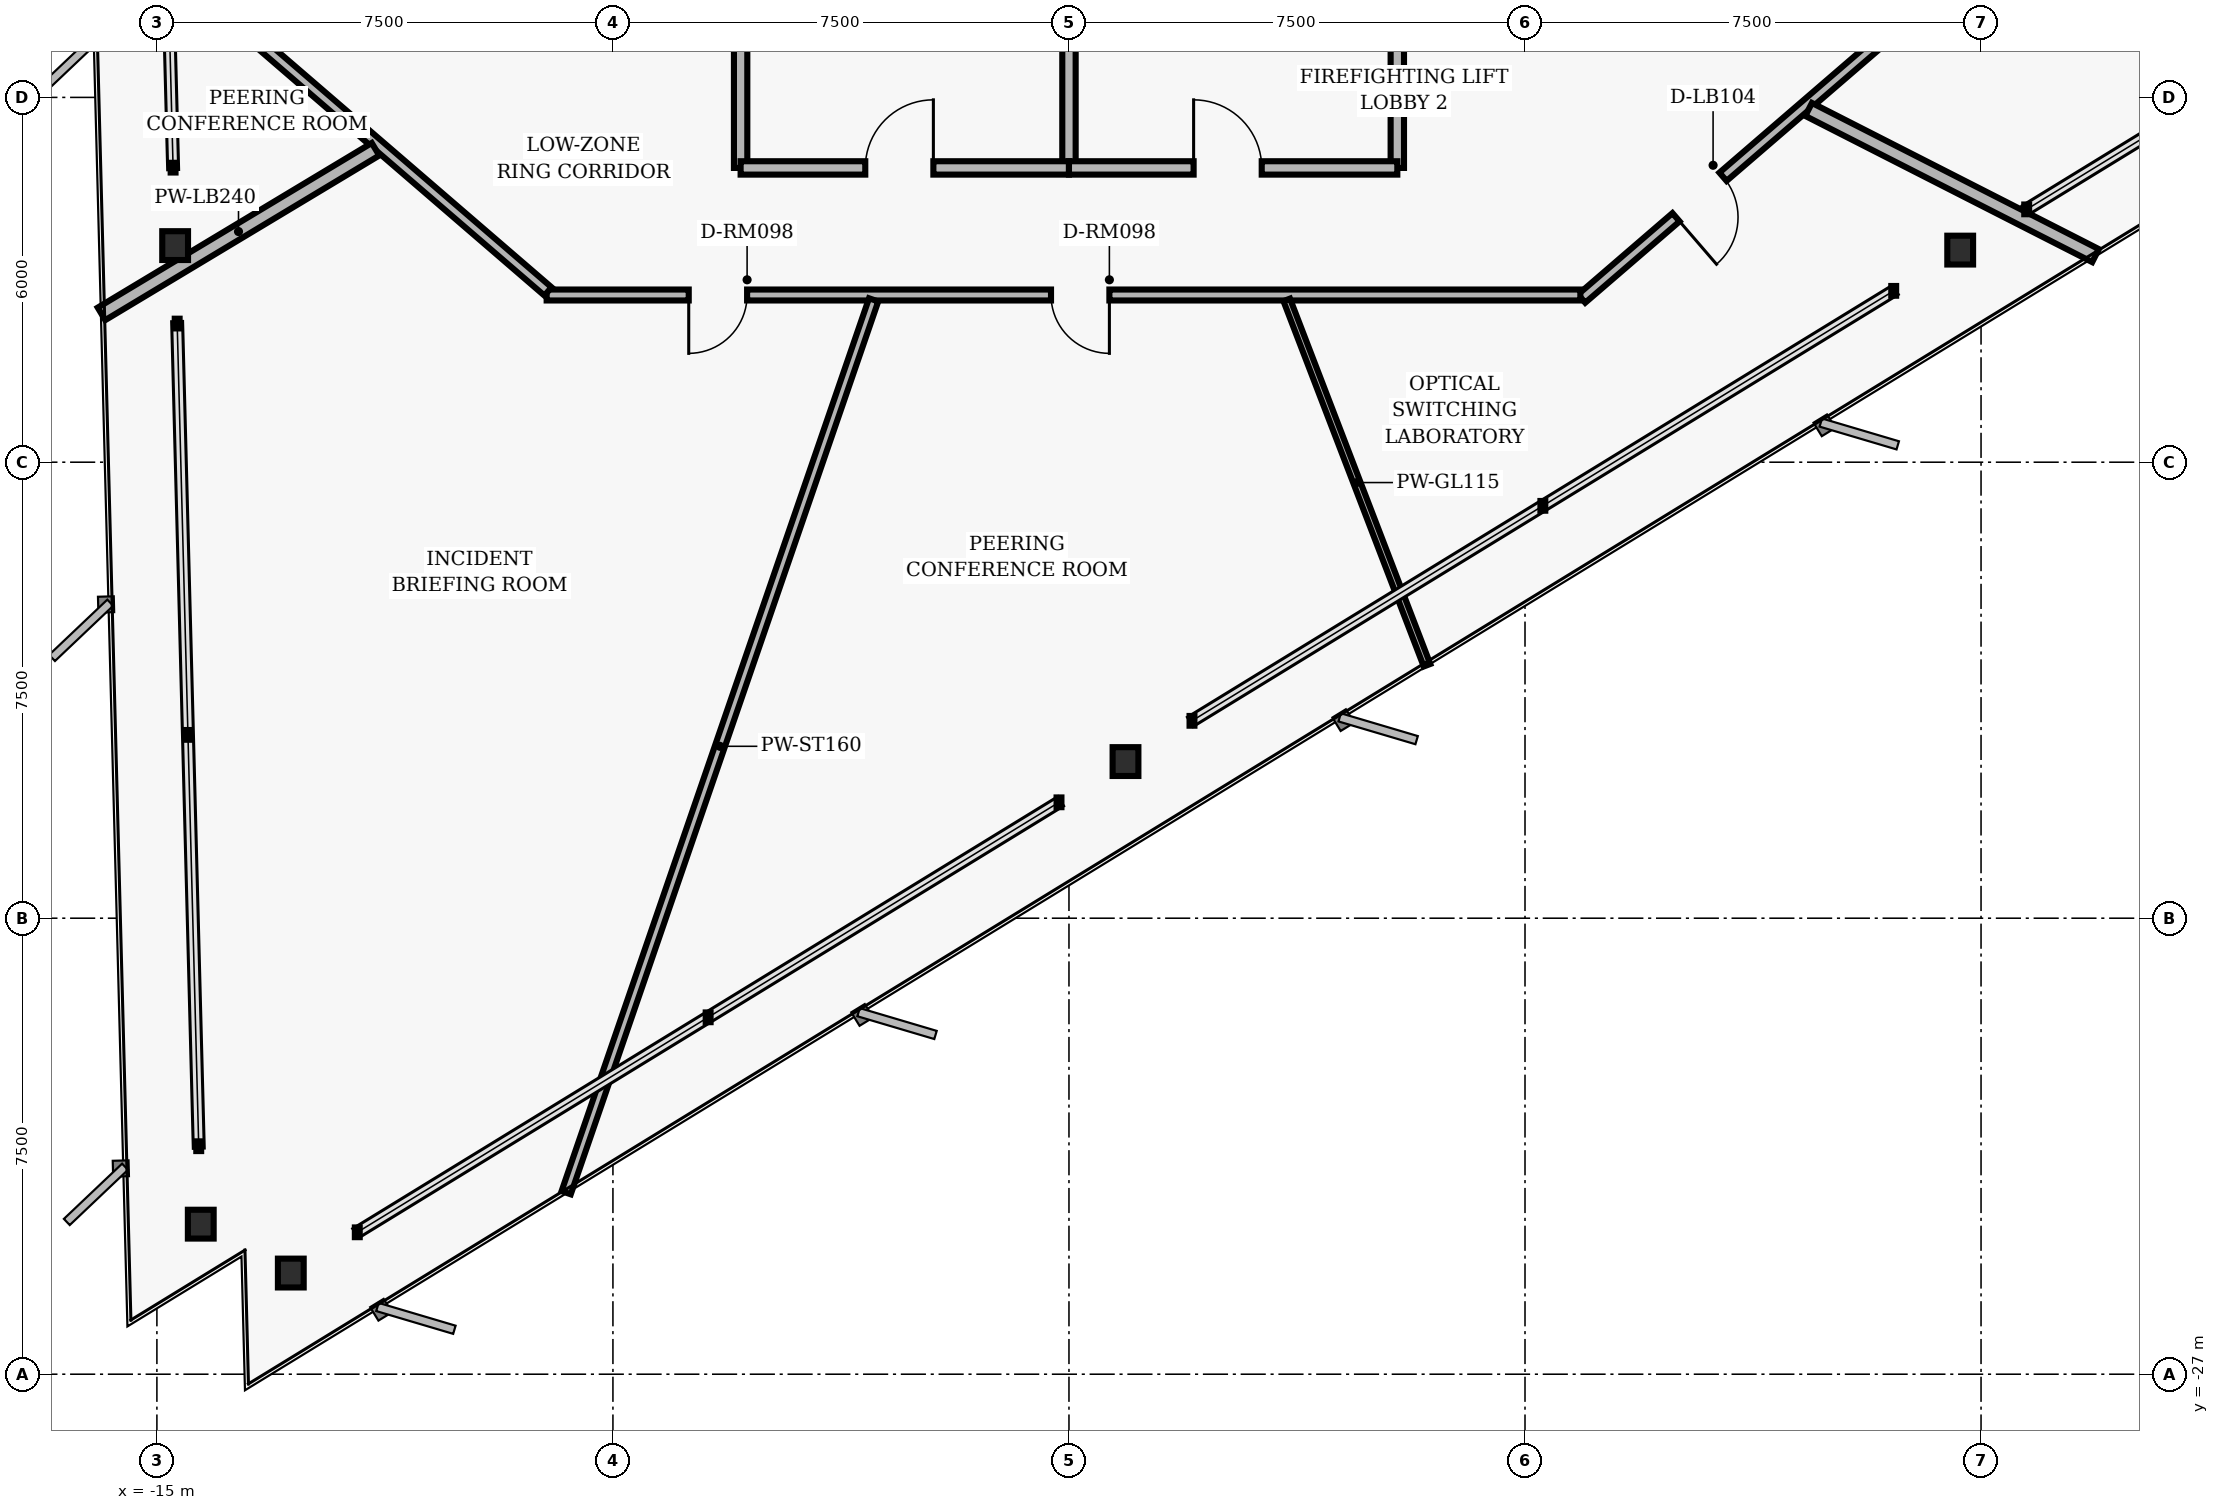
"""IFC4 building model, lengths in metres.
Left out: names, types, materials, properties, quantities, classifications, styles, units other than length and angle.
Written with IfcOpenShell. Run it as: python <this file> out.ifc"""

import sys

from ifc_helpers import new_model, si_unit, direction, frame, frame_2d, origin, origin_2d, place, context, subcontext, project, spatial, rectangle, i_section, extrude, element, fill, save


model = new_model("IFC4")
c1 = context("Model", 3, precision=1e-05, world=origin(), true_north=direction((0.0, 1.0)))
c2 = subcontext(c1, "Body", "Model", "MODEL_VIEW")
j1 = project(units=[si_unit("LENGTHUNIT", "METRE"), si_unit("PLANEANGLEUNIT", "RADIAN")], contexts=[c1])
p1 = place(None, origin())
s1 = spatial("IfcSite", under=j1, at=p1, CompositionType="ELEMENT")
p2 = place(p1, origin())
s2 = spatial("IfcBuilding", under=s1, at=p2, CompositionType="ELEMENT")
p3 = place(p2, frame((0.0, 0.0, 35.68)))
s3 = spatial("IfcBuildingStorey", under=s2, at=p3, CompositionType="ELEMENT", Elevation=35.68)
for number, where, z_axis, x_axis in (
    (1, (-14.7, -8.438, 0.0), (0.0, 0.0, 1.0), (1.0, 0.0, 0.0)),
    (2, (-14.279, -24.532, 0.0), (0.0, 0.0, 1.0), (1.0, 0.0, 0.0)),
    (3, (-12.798, -25.336, 0.0), (0.0, 0.0, 1.0), (1.0, 0.0, 0.0)),
    (4, (0.93, -16.924, 0.0), (0.0, 0.0, 1.0), (1.0, 0.0, 0.0)),
    (5, (14.657, -8.512, 0.0), (0.0, 0.0, 1.0), (1.0, 0.0, 0.0)),
):
    element("IfcColumn", number, at=place(p3, frame(where, z_axis=z_axis, x_axis=x_axis)), inside=s3, PredefinedType="COLUMN", context=c2, shape_type="SweptSolid", body=[
        extrude(i_section(OverallWidth=0.424, OverallDepth=0.474, WebThickness=0.048, FlangeThickness=0.077, FilletRadius=0.025, at=origin_2d()), origin(), (0.0, 0.0, 1.0), 3.36),
    ])
for number, where, z_axis, x_axis in (
    (6, (-5.4, -7.16, 0.0), (0.0, 0.0, 1.0), (0.0, 1.0, 0.0)),
    (7, (5.4, -7.16, 0.0), (0.0, 0.0, 1.0), (0.0, 1.0, 0.0)),
):
    element("IfcWall", number, at=place(p3, frame(where, z_axis=z_axis, x_axis=x_axis)), inside=s3, PredefinedType="PARTITIONING", context=c2, shape_type="SweptSolid", body=[
        extrude(rectangle(XDim=2.71, YDim=0.22, at=frame_2d((1.355, 0.0))), origin(), (0.0, 0.0, 1.0), 3.073),
    ])
p4 = place(p3, frame((0.0, -7.16, 0.0), z_axis=(0.0, 0.0, 1.0), x_axis=(0.0, 1.0, 0.0)))
e8 = element("IfcWall", 8, at=p4, inside=s3, PredefinedType="PARTITIONING", context=c2, shape_type="SweptSolid", body=[
    extrude(rectangle(XDim=2.81, YDim=0.22, at=frame_2d((1.405, 0.0))), origin(), (0.0, 0.0, 1.0), 3.073),
])
p5 = place(p3, frame((-5.4, -7.16, 0.0), z_axis=(0.0, 0.0, 1.0), x_axis=(1.0, 0.0, 0.0)))
e9 = element("IfcWall", 9, at=p5, inside=s3, PredefinedType="PARTITIONING", context=c2, shape_type="SweptSolid", body=[
    extrude(rectangle(XDim=5.4, YDim=0.22, at=frame_2d((2.7, 0.0))), origin(), (0.0, 0.0, 1.0), 3.073),
])
p6 = place(p5, frame((2.05, 0.0, 0.0)))
e10 = element("IfcOpeningElement", 10, at=p6, cuts=e9, PredefinedType="OPENING", context=c2, shape_type="SweptSolid", body=[
    extrude(rectangle(XDim=1.12, YDim=2.02, at=frame_2d((0.56, 1.01))), frame((0.0, 0.12, 0.0), z_axis=(0.0, -1.0, 0.0), x_axis=(1.0, 0.0, 0.0)), (0.0, 0.0, 1.0), 0.24),
])
p7 = place(p3, frame((0.0, -7.16, 0.0), z_axis=(0.0, 0.0, 1.0), x_axis=(1.0, 0.0, 0.0)))
e11 = element("IfcWall", 11, at=p7, inside=s3, PredefinedType="PARTITIONING", context=c2, shape_type="SweptSolid", body=[
    extrude(rectangle(XDim=5.4, YDim=0.22, at=frame_2d((2.7, 0.0))), origin(), (0.0, 0.0, 1.0), 3.073),
])
p8 = place(p7, frame((2.05, 0.0, 0.0)))
e12 = element("IfcOpeningElement", 12, at=p8, cuts=e11, PredefinedType="OPENING", context=c2, shape_type="SweptSolid", body=[
    extrude(rectangle(XDim=1.12, YDim=2.02, at=frame_2d((0.56, 1.01))), frame((0.0, 0.12, 0.0), z_axis=(0.0, -1.0, 0.0), x_axis=(1.0, 0.0, 0.0)), (0.0, 0.0, 1.0), 0.24),
])
p9 = place(p3, frame((13.268, -5.141, 0.0), z_axis=(0.0, 0.0, 1.0), x_axis=(-0.757534501725, -0.65279512766, 0.0)))
e13 = element("IfcWall", 13, at=p9, inside=s3, PredefinedType="PARTITIONING", context=c2, shape_type="SweptSolid", body=[
    extrude(rectangle(XDim=6.385, YDim=0.18, at=frame_2d((3.192, 0.0))), origin(), (0.0, 0.0, 1.0), 2.587),
])
p10 = place(p9, frame((3.316, 0.0, 0.0)))
e14 = element("IfcOpeningElement", 14, at=p10, cuts=e13, PredefinedType="OPENING", context=c2, shape_type="SweptSolid", body=[
    extrude(rectangle(XDim=1.02, YDim=2.02, at=frame_2d((0.51, 1.01))), frame((0.0, 0.1, 0.0), z_axis=(0.0, -1.0, 0.0), x_axis=(1.0, 0.0, 0.0)), (0.0, 0.0, 1.0), 0.2),
])
p11 = place(p3, frame((8.41, -9.25, 0.0), z_axis=(0.0, 0.0, 1.0), x_axis=(-1.0, 0.0, 0.0)))
e15 = element("IfcWall", 15, at=p11, inside=s3, PredefinedType="PARTITIONING", context=c2, shape_type="SweptSolid", body=[
    extrude(rectangle(XDim=17.0, YDim=0.18, at=frame_2d((8.5, 0.0))), origin(), (0.0, 0.0, 1.0), 2.587),
])
p12 = place(p11, frame((13.703, 0.0, 0.0)))
e16 = element("IfcOpeningElement", 16, at=p12, cuts=e15, PredefinedType="OPENING", context=c2, shape_type="SweptSolid", body=[
    extrude(rectangle(XDim=0.96, YDim=2.02, at=frame_2d((0.48, 1.01))), frame((0.0, 0.1, 0.0), z_axis=(0.0, -1.0, 0.0), x_axis=(1.0, 0.0, 0.0)), (0.0, 0.0, 1.0), 0.2),
])
p13 = place(p11, frame((7.745, 0.0, 0.0)))
e17 = element("IfcOpeningElement", 17, at=p13, cuts=e15, PredefinedType="OPENING", context=c2, shape_type="SweptSolid", body=[
    extrude(rectangle(XDim=0.96, YDim=2.02, at=frame_2d((0.48, 1.01))), frame((0.0, 0.1, 0.0), z_axis=(0.0, -1.0, 0.0), x_axis=(1.0, 0.0, 0.0)), (0.0, 0.0, 1.0), 0.2),
])
p14 = place(p3, frame((-8.568, -9.191, 0.0), z_axis=(0.0, 0.0, 1.0), x_axis=(-0.757556899173, 0.652769135694, 0.0)))
e18 = element("IfcWall", 18, at=p14, inside=s3, PredefinedType="PARTITIONING", context=c2, shape_type="SweptSolid", body=[
    extrude(rectangle(XDim=6.204, YDim=0.18, at=frame_2d((3.102, 0.0))), origin(), (0.0, 0.0, 1.0), 3.073),
])
p15 = place(p3, frame((-11.405, -6.853, 0.0), z_axis=(0.0, 0.0, 1.0), x_axis=(-0.857148529273, -0.515069314524, 0.0)))
e19 = element("IfcWall", 19, at=p15, inside=s3, PredefinedType="PARTITIONING", context=c2, shape_type="SweptSolid", body=[
    extrude(rectangle(XDim=5.257, YDim=0.24, at=frame_2d((2.628, 0.0))), origin(), (0.0, 0.0, 1.0), 2.358),
])
p16 = place(p3, frame((-3.213, -9.33, 0.0), z_axis=(0.0, 0.0, 1.0), x_axis=(-0.325559016245, -0.945521722089, 0.0)))
e20 = element("IfcWall", 20, at=p16, inside=s3, PredefinedType="PARTITIONING", context=c2, shape_type="SweptSolid", body=[
    extrude(rectangle(XDim=15.531, YDim=0.16, at=frame_2d((7.766, 0.0))), origin(), (0.0, 0.0, 1.0), 3.073),
])
p17 = place(p3, frame((3.582, -9.33, 0.0), z_axis=(0.0, 0.0, 1.0), x_axis=(0.358341066906, -0.933590745332, 0.0)))
e21 = element("IfcWall", 21, at=p17, inside=s3, PredefinedType="MOVABLE", context=c2, shape_type="SweptSolid", body=[
    extrude(rectangle(XDim=6.437, YDim=0.115, at=frame_2d((3.219, 0.0))), origin(), (0.0, 0.0, 1.0), 3.073),
])
p18 = place(p3, frame((12.164, -6.198, 0.0), z_axis=(0.0, 0.0, 1.0), x_axis=(0.890999034188, -0.454005199394, 0.0)))
e22 = element("IfcWall", 22, at=p18, inside=s3, PredefinedType="PARTITIONING", context=c2, shape_type="SweptSolid", body=[
    extrude(rectangle(XDim=5.296, YDim=0.24, at=frame_2d((2.648, 0.0))), origin(), (0.0, 0.0, 1.0), 2.358),
])
p19 = place(p6, origin())
e23 = element("IfcDoor", 23, at=p19, inside=s3, OperationType="SINGLE_SWING_RIGHT", PredefinedType="DOOR", context=c2, shape_type="SweptSolid", body=[
    extrude(rectangle(XDim=1.12, YDim=2.02, at=frame_2d((0.56, 1.01))), frame((0.0, 0.025, 0.0), z_axis=(0.0, -1.0, 0.0), x_axis=(1.0, 0.0, 0.0)), (0.0, 0.0, 1.0), 0.05),
])
fill(e10, e23)
p20 = place(p8, origin())
e24 = element("IfcDoor", 24, at=p20, inside=s3, OperationType="SINGLE_SWING_LEFT", PredefinedType="DOOR", context=c2, shape_type="SweptSolid", body=[
    extrude(rectangle(XDim=1.12, YDim=2.02, at=frame_2d((0.56, 1.01))), frame((0.0, 0.025, 0.0), z_axis=(0.0, -1.0, 0.0), x_axis=(1.0, 0.0, 0.0)), (0.0, 0.0, 1.0), 0.05),
])
fill(e12, e24)
p21 = place(p12, origin())
e25 = element("IfcDoor", 25, at=p21, inside=s3, OperationType="SINGLE_SWING_RIGHT", PredefinedType="DOOR", context=c2, shape_type="SweptSolid", body=[
    extrude(rectangle(XDim=0.96, YDim=2.02, at=frame_2d((0.48, 1.01))), frame((0.0, 0.025, 0.0), z_axis=(0.0, -1.0, 0.0), x_axis=(1.0, 0.0, 0.0)), (0.0, 0.0, 1.0), 0.05),
])
fill(e16, e25)
p22 = place(p13, origin())
e26 = element("IfcDoor", 26, at=p22, inside=s3, OperationType="SINGLE_SWING_LEFT", PredefinedType="DOOR", context=c2, shape_type="SweptSolid", body=[
    extrude(rectangle(XDim=0.96, YDim=2.02, at=frame_2d((0.48, 1.01))), frame((0.0, 0.025, 0.0), z_axis=(0.0, -1.0, 0.0), x_axis=(1.0, 0.0, 0.0)), (0.0, 0.0, 1.0), 0.05),
])
fill(e17, e26)
p23 = place(p10, origin())
e27 = element("IfcDoor", 27, at=p23, inside=s3, OperationType="SINGLE_SWING_RIGHT", PredefinedType="DOOR", context=c2, shape_type="SweptSolid", body=[
    extrude(rectangle(XDim=1.02, YDim=2.02, at=frame_2d((0.51, 1.01))), frame((0.0, 0.025, 0.0), z_axis=(0.0, -1.0, 0.0), x_axis=(1.0, 0.0, 0.0)), (0.0, 0.0, 1.0), 0.05),
])
fill(e14, e27)
save(model, sys.argv[1])
